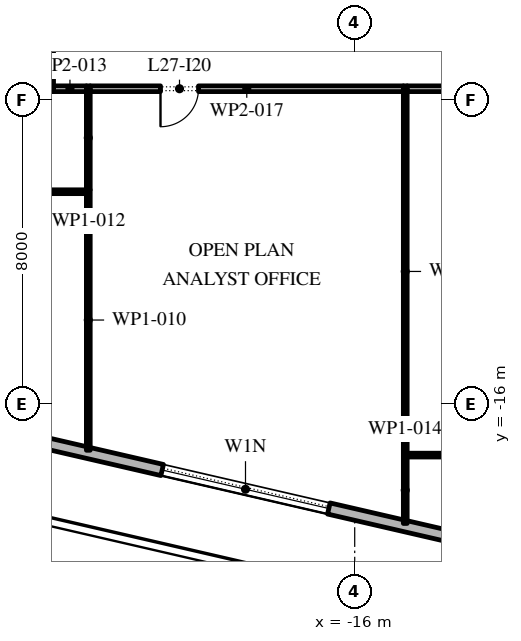
"""IFC4 building model, lengths in metres.
Left out: names, types, materials, properties, quantities, classifications, styles, units other than length and angle.
Written with IfcOpenShell. Run it as: python <this file> out.ifc"""

import sys

from ifc_helpers import new_model, si_unit, direction, frame, frame_2d, origin, place, context, subcontext, project, spatial, rectangle, extrude, element, fill, save


model = new_model("IFC4")
c1 = context("Model", 3, precision=1e-05, world=origin(), true_north=direction((0.0, 1.0)))
c2 = subcontext(c1, "Body", "Model", "MODEL_VIEW")
j1 = project(units=[si_unit("LENGTHUNIT", "METRE"), si_unit("PLANEANGLEUNIT", "RADIAN")], contexts=[c1])
p1 = place(None, origin())
s1 = spatial("IfcSite", under=j1, at=p1, CompositionType="ELEMENT")
p2 = place(p1, origin())
s2 = spatial("IfcBuilding", under=s1, at=p2, CompositionType="ELEMENT")
p3 = place(p2, frame((0.0, 0.0, 126.6)))
s3 = spatial("IfcBuildingStorey", under=s2, at=p3, CompositionType="ELEMENT", Elevation=126.6)
p4 = place(p3, frame((-31.078, -15.421, 0.0), z_axis=(0.0, 0.0, 1.0), x_axis=(0.974370456532, -0.224949357493, 0.0)))
e1 = element("IfcWall", 1, at=p4, inside=s3, PredefinedType="STANDARD", context=c2, shape_type="SweptSolid", body=[
    extrude(rectangle(XDim=51.0, YDim=0.3, at=frame_2d((25.5, 0.0))), origin(), (0.0, 0.0, 1.0), 4.0),
])
p5 = place(p4, frame((1.875, 0.0, 0.45)))
e2 = element("IfcOpeningElement", 2, at=p5, cuts=e1, PredefinedType="OPENING", context=c2, shape_type="SweptSolid", body=[
    extrude(rectangle(XDim=4.5, YDim=2.65, at=frame_2d((2.25, 1.325))), frame((0.0, 0.16, 0.0), z_axis=(0.0, -1.0, 0.0), x_axis=(1.0, 0.0, 0.0)), (0.0, 0.0, 1.0), 0.32),
])
p6 = place(p4, frame((10.275, 0.0, 0.45)))
e3 = element("IfcOpeningElement", 3, at=p6, cuts=e1, PredefinedType="OPENING", context=c2, shape_type="SweptSolid", body=[
    extrude(rectangle(XDim=4.5, YDim=2.525, at=frame_2d((2.25, 1.262))), frame((0.0, 0.16, 0.0), z_axis=(0.0, -1.0, 0.0), x_axis=(1.0, 0.0, 0.0)), (0.0, 0.0, 1.0), 0.32),
])
p7 = place(p4, frame((18.825, 0.0, 0.45)))
e4 = element("IfcOpeningElement", 4, at=p7, cuts=e1, PredefinedType="OPENING", context=c2, shape_type="SweptSolid", body=[
    extrude(rectangle(XDim=4.5, YDim=2.5, at=frame_2d((2.25, 1.25))), frame((0.0, 0.16, 0.0), z_axis=(0.0, -1.0, 0.0), x_axis=(1.0, 0.0, 0.0)), (0.0, 0.0, 1.0), 0.32),
])
p8 = place(p4, frame((28.425, 0.0, 0.0)))
e5 = element("IfcOpeningElement", 5, at=p8, cuts=e1, PredefinedType="OPENING", context=c2, shape_type="SweptSolid", body=[
    extrude(rectangle(XDim=2.4, YDim=2.9, at=frame_2d((1.2, 1.45))), frame((0.0, 0.16, 0.0), z_axis=(0.0, -1.0, 0.0), x_axis=(1.0, 0.0, 0.0)), (0.0, 0.0, 1.0), 0.32),
])
p9 = place(p4, frame((35.925, 0.0, 0.45)))
e6 = element("IfcOpeningElement", 6, at=p9, cuts=e1, PredefinedType="OPENING", context=c2, shape_type="SweptSolid", body=[
    extrude(rectangle(XDim=4.5, YDim=2.45, at=frame_2d((2.25, 1.225))), frame((0.0, 0.16, 0.0), z_axis=(0.0, -1.0, 0.0), x_axis=(1.0, 0.0, 0.0)), (0.0, 0.0, 1.0), 0.32),
])
p10 = place(p4, frame((44.475, 0.0, 0.45)))
e7 = element("IfcOpeningElement", 7, at=p10, cuts=e1, PredefinedType="OPENING", context=c2, shape_type="SweptSolid", body=[
    extrude(rectangle(XDim=4.5, YDim=2.45, at=frame_2d((2.25, 1.225))), frame((0.0, 0.16, 0.0), z_axis=(0.0, -1.0, 0.0), x_axis=(1.0, 0.0, 0.0)), (0.0, 0.0, 1.0), 0.32),
])
p11 = place(p3, frame((-22.82, 37.016, 0.0), z_axis=(0.0, 0.0, 1.0), x_axis=(-0.224953880882, -0.974369412223, 0.0)))
e8 = element("IfcWall", 8, at=p11, inside=s3, PredefinedType="STANDARD", context=c2, shape_type="SweptSolid", body=[
    extrude(rectangle(XDim=49.5, YDim=0.3, at=frame_2d((24.75, 0.0))), origin(), (0.0, 0.0, 1.0), 4.0),
])
p12 = place(p11, frame((1.157, 0.0, 0.45)))
e9 = element("IfcOpeningElement", 9, at=p12, cuts=e8, PredefinedType="OPENING", context=c2, shape_type="SweptSolid", body=[
    extrude(rectangle(XDim=4.5, YDim=3.05, at=frame_2d((2.25, 1.525))), frame((0.0, 0.16, 0.0), z_axis=(0.0, -1.0, 0.0), x_axis=(1.0, 0.0, 0.0)), (0.0, 0.0, 1.0), 0.32),
])
p13 = place(p11, frame((8.121, 0.0, 0.45)))
e10 = element("IfcOpeningElement", 10, at=p13, cuts=e8, PredefinedType="OPENING", context=c2, shape_type="SweptSolid", body=[
    extrude(rectangle(XDim=4.5, YDim=3.05, at=frame_2d((2.25, 1.525))), frame((0.0, 0.16, 0.0), z_axis=(0.0, -1.0, 0.0), x_axis=(1.0, 0.0, 0.0)), (0.0, 0.0, 1.0), 0.32),
])
p14 = place(p11, frame((15.236, 0.0, 0.45)))
e11 = element("IfcOpeningElement", 11, at=p14, cuts=e8, PredefinedType="OPENING", context=c2, shape_type="SweptSolid", body=[
    extrude(rectangle(XDim=4.5, YDim=3.05, at=frame_2d((2.25, 1.525))), frame((0.0, 0.16, 0.0), z_axis=(0.0, -1.0, 0.0), x_axis=(1.0, 0.0, 0.0)), (0.0, 0.0, 1.0), 0.32),
])
p15 = place(p11, frame((23.4, 0.0, 0.0)))
e12 = element("IfcOpeningElement", 12, at=p15, cuts=e8, PredefinedType="OPENING", context=c2, shape_type="SweptSolid", body=[
    extrude(rectangle(XDim=2.4, YDim=3.5, at=frame_2d((1.2, 1.75))), frame((0.0, 0.16, 0.0), z_axis=(0.0, -1.0, 0.0), x_axis=(1.0, 0.0, 0.0)), (0.0, 0.0, 1.0), 0.32),
])
p16 = place(p11, frame((29.464, 0.0, 0.45)))
e13 = element("IfcOpeningElement", 13, at=p16, cuts=e8, PredefinedType="OPENING", context=c2, shape_type="SweptSolid", body=[
    extrude(rectangle(XDim=4.5, YDim=2.875, at=frame_2d((2.25, 1.438))), frame((0.0, 0.16, 0.0), z_axis=(0.0, -1.0, 0.0), x_axis=(1.0, 0.0, 0.0)), (0.0, 0.0, 1.0), 0.32),
])
p17 = place(p11, frame((36.579, 0.0, 0.45)))
e14 = element("IfcOpeningElement", 14, at=p17, cuts=e8, PredefinedType="OPENING", context=c2, shape_type="SweptSolid", body=[
    extrude(rectangle(XDim=4.5, YDim=2.675, at=frame_2d((2.25, 1.337))), frame((0.0, 0.16, 0.0), z_axis=(0.0, -1.0, 0.0), x_axis=(1.0, 0.0, 0.0)), (0.0, 0.0, 1.0), 0.32),
])
p18 = place(p11, frame((43.693, 0.0, 0.45)))
e15 = element("IfcOpeningElement", 15, at=p18, cuts=e8, PredefinedType="OPENING", context=c2, shape_type="SweptSolid", body=[
    extrude(rectangle(XDim=4.5, YDim=3.05, at=frame_2d((2.25, 1.525))), frame((0.0, 0.16, 0.0), z_axis=(0.0, -1.0, 0.0), x_axis=(1.0, 0.0, 0.0)), (0.0, 0.0, 1.0), 0.32),
])
p19 = place(p3, frame((-24.0, -7.775, 0.0), z_axis=(0.0, 0.0, 1.0), x_axis=(0.0, 1.0, 0.0)))
e16 = element("IfcWall", 16, at=p19, inside=s3, PredefinedType="PARTITIONING", context=c2, shape_type="SweptSolid", body=[
    extrude(rectangle(XDim=3.455, YDim=0.15, at=frame_2d((1.728, 0.0))), origin(), (0.0, 0.0, 1.0), 4.0),
])
p20 = place(p19, frame((2.055, 0.0, 0.0)))
e17 = element("IfcOpeningElement", 17, at=p20, cuts=e16, PredefinedType="OPENING", context=c2, shape_type="SweptSolid", body=[
    extrude(rectangle(XDim=1.0, YDim=2.1, at=frame_2d((0.5, 1.05))), frame((0.0, 0.085, 0.0), z_axis=(0.0, -1.0, 0.0), x_axis=(1.0, 0.0, 0.0)), (0.0, 0.0, 1.0), 0.17),
])
p21 = place(p3, frame((-23.01, -17.212, 0.0), z_axis=(0.0, 0.0, 1.0), x_axis=(0.0, 1.0, 0.0)))
e18 = element("IfcWall", 18, at=p21, inside=s3, PredefinedType="PARTITIONING", context=c2, shape_type="SweptSolid", body=[
    extrude(rectangle(XDim=6.852, YDim=0.1, at=frame_2d((3.426, 0.0))), origin(), (0.0, 0.0, 1.0), 4.0),
])
p22 = place(p3, frame((-23.06, -10.41, 0.0), z_axis=(0.0, 0.0, 1.0), x_axis=(-1.0, 0.0, 0.0)))
e19 = element("IfcWall", 19, at=p22, inside=s3, PredefinedType="PARTITIONING", context=c2, shape_type="SweptSolid", body=[
    extrude(rectangle(XDim=8.97, YDim=0.1, at=frame_2d((4.485, 0.0))), origin(), (0.0, 0.0, 1.0), 4.0),
])
p23 = place(p22, frame((3.17, 0.0, 0.0)))
e20 = element("IfcOpeningElement", 20, at=p23, cuts=e19, PredefinedType="OPENING", context=c2, shape_type="SweptSolid", body=[
    extrude(rectangle(XDim=0.9, YDim=2.1, at=frame_2d((0.45, 1.05))), frame((0.0, 0.06, 0.0), z_axis=(0.0, -1.0, 0.0), x_axis=(1.0, 0.0, 0.0)), (0.0, 0.0, 1.0), 0.12),
])
p24 = place(p3, frame((-23.01, -10.36, 0.0), z_axis=(0.0, 0.0, 1.0), x_axis=(0.0, 1.0, 0.0)))
e21 = element("IfcWall", 21, at=p24, inside=s3, PredefinedType="PARTITIONING", context=c2, shape_type="SweptSolid", body=[
    extrude(rectangle(XDim=2.735, YDim=0.1, at=frame_2d((1.368, 0.0))), origin(), (0.0, 0.0, 1.0), 4.0),
])
p25 = place(p3, frame((-23.06, -7.7, 0.0), z_axis=(0.0, 0.0, 1.0), x_axis=(-1.0, 0.0, 0.0)))
e22 = element("IfcWall", 22, at=p25, inside=s3, PredefinedType="PARTITIONING", context=c2, shape_type="SweptSolid", body=[
    extrude(rectangle(XDim=0.865, YDim=0.15, at=frame_2d((0.433, 0.0))), origin(), (0.0, 0.0, 1.0), 4.0),
])
p26 = place(p3, frame((-14.67, -19.138, 0.0), z_axis=(0.0, 0.0, 1.0), x_axis=(0.0, 1.0, 0.0)))
e23 = element("IfcWall", 23, at=p26, inside=s3, PredefinedType="PARTITIONING", context=c2, shape_type="SweptSolid", body=[
    extrude(rectangle(XDim=1.748, YDim=0.1, at=frame_2d((0.874, 0.0))), origin(), (0.0, 0.0, 1.0), 4.0),
])
p27 = place(p3, frame((-14.67, -17.39, 0.0), z_axis=(0.0, 0.0, 1.0), x_axis=(0.0, 1.0, 0.0)))
e24 = element("IfcWall", 24, at=p27, inside=s3, PredefinedType="PARTITIONING", context=c2, shape_type="SweptSolid", body=[
    extrude(rectangle(XDim=9.765, YDim=0.1, at=frame_2d((4.882, 0.0))), origin(), (0.0, 0.0, 1.0), 4.0),
])
p28 = place(p3, frame((-14.62, -17.34, 0.0), z_axis=(0.0, 0.0, 1.0), x_axis=(1.0, 0.0, 0.0)))
e25 = element("IfcWall", 25, at=p28, inside=s3, PredefinedType="PARTITIONING", context=c2, shape_type="SweptSolid", body=[
    extrude(rectangle(XDim=7.07, YDim=0.1, at=frame_2d((3.535, 0.0))), origin(), (0.0, 0.0, 1.0), 4.0),
])
p29 = place(p3, frame((-14.72, -7.7, 0.0), z_axis=(0.0, 0.0, 1.0), x_axis=(-1.0, 0.0, 0.0)))
e26 = element("IfcWall", 26, at=p29, inside=s3, PredefinedType="PARTITIONING", context=c2, shape_type="SweptSolid", body=[
    extrude(rectangle(XDim=8.24, YDim=0.15, at=frame_2d((4.12, 0.0))), origin(), (0.0, 0.0, 1.0), 4.0),
])
p30 = place(p29, frame((5.39, 0.0, 0.0)))
e27 = element("IfcOpeningElement", 27, at=p30, cuts=e26, PredefinedType="OPENING", context=c2, shape_type="SweptSolid", body=[
    extrude(rectangle(XDim=1.0, YDim=2.1, at=frame_2d((0.5, 1.05))), frame((0.0, 0.085, 0.0), z_axis=(0.0, -1.0, 0.0), x_axis=(1.0, 0.0, 0.0)), (0.0, 0.0, 1.0), 0.17),
])
p31 = place(p3, frame((-7.925, -7.7, 0.0), z_axis=(0.0, 0.0, 1.0), x_axis=(-1.0, 0.0, 0.0)))
e28 = element("IfcWall", 28, at=p31, inside=s3, PredefinedType="PARTITIONING", context=c2, shape_type="SweptSolid", body=[
    extrude(rectangle(XDim=6.695, YDim=0.15, at=frame_2d((3.348, 0.0))), origin(), (0.0, 0.0, 1.0), 4.0),
])
p32 = place(p31, frame((2.845, 0.0, 0.0)))
e29 = element("IfcOpeningElement", 29, at=p32, cuts=e28, PredefinedType="OPENING", context=c2, shape_type="SweptSolid", body=[
    extrude(rectangle(XDim=1.0, YDim=2.1, at=frame_2d((0.5, 1.05))), frame((0.0, 0.085, 0.0), z_axis=(0.0, -1.0, 0.0), x_axis=(1.0, 0.0, 0.0)), (0.0, 0.0, 1.0), 0.17),
])
p33 = place(p6, origin())
e30 = element("IfcWindow", 30, at=p33, inside=s3, PartitioningType="DOUBLE_PANEL_VERTICAL", PredefinedType="WINDOW", context=c2, shape_type="SweptSolid", body=[
    extrude(rectangle(XDim=4.5, YDim=2.525, at=frame_2d((2.25, 1.262))), frame((0.0, 0.03, 0.0), z_axis=(0.0, -1.0, 0.0), x_axis=(1.0, 0.0, 0.0)), (0.0, 0.0, 1.0), 0.06),
])
fill(e3, e30)
p34 = place(p30, origin())
e31 = element("IfcDoor", 31, at=p34, inside=s3, OperationType="SINGLE_SWING_LEFT", PredefinedType="DOOR", context=c2, shape_type="SweptSolid", body=[
    extrude(rectangle(XDim=1.0, YDim=2.1, at=frame_2d((0.5, 1.05))), frame((0.0, 0.025, 0.0), z_axis=(0.0, -1.0, 0.0), x_axis=(1.0, 0.0, 0.0)), (0.0, 0.0, 1.0), 0.05),
])
fill(e27, e31)
save(model, sys.argv[1])
